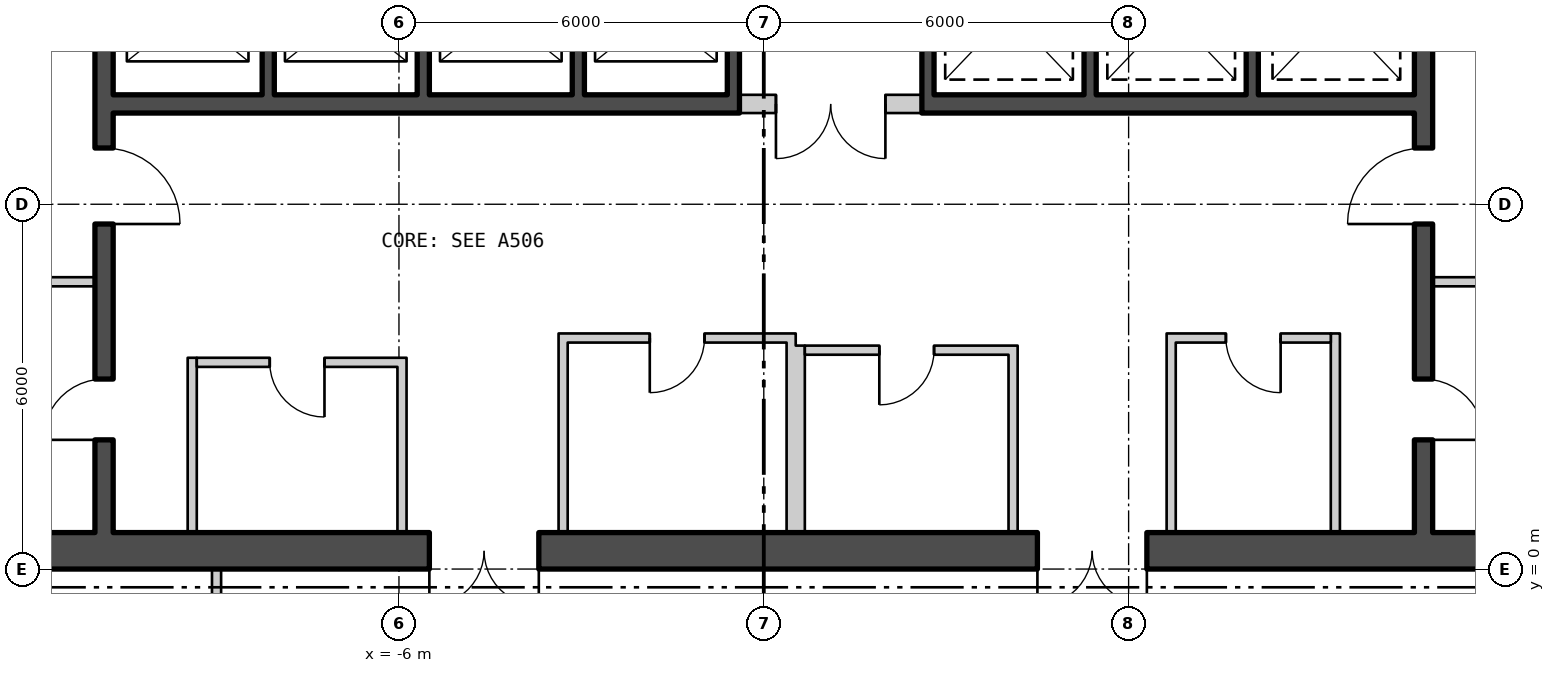
"""IFC4 building model, lengths in metres.
Left out: names, types, materials, properties, quantities, classifications, styles, units other than length and angle.
Written with IfcOpenShell. Run it as: python <this file> out.ifc"""

import sys

from ifc_helpers import new_model, si_unit, direction, frame, frame_2d, origin, place, context, subcontext, project, spatial, rectangle, extrude, element, fill, save


model = new_model("IFC4")
c1 = context("Model", 3, precision=1e-05, world=origin(), true_north=direction((0.0, 1.0)))
c2 = subcontext(c1, "Body", "Model", "MODEL_VIEW")
j1 = project(units=[si_unit("LENGTHUNIT", "METRE"), si_unit("PLANEANGLEUNIT", "RADIAN")], contexts=[c1])
p1 = place(None, origin())
s1 = spatial("IfcSite", under=j1, at=p1, CompositionType="ELEMENT")
p2 = place(p1, origin())
s2 = spatial("IfcBuilding", under=s1, at=p2, CompositionType="ELEMENT")
p3 = place(p2, frame((0.0, 0.0, 13.5)))
s3 = spatial("IfcBuildingStorey", under=s2, at=p3, CompositionType="ELEMENT", Elevation=13.5)
p4 = place(p3, frame((-17.5, 0.3, 0.0), z_axis=(0.0, 0.0, 1.0), x_axis=(1.0, 0.0, 0.0)))
e1 = element("IfcWall", 1, at=p4, inside=s3, PredefinedType="SHEAR", context=c2, shape_type="SweptSolid", body=[
    extrude(rectangle(XDim=35.0, YDim=0.6, at=frame_2d((17.5, 0.0))), origin(), (0.0, 0.0, 1.0), 4.88),
])
p5 = place(p4, frame((12.0, 0.0, 0.0)))
e2 = element("IfcOpeningElement", 2, at=p5, cuts=e1, PredefinedType="OPENING", context=c2, shape_type="SweptSolid", body=[
    extrude(rectangle(XDim=1.8, YDim=2.4, at=frame_2d((0.9, 1.2))), frame((0.0, 0.31, 0.0), z_axis=(0.0, -1.0, 0.0), x_axis=(1.0, 0.0, 0.0)), (0.0, 0.0, 1.0), 0.62),
])
p6 = place(p4, frame((22.0, 0.0, 0.0)))
e3 = element("IfcOpeningElement", 3, at=p6, cuts=e1, PredefinedType="OPENING", context=c2, shape_type="SweptSolid", body=[
    extrude(rectangle(XDim=1.8, YDim=2.4, at=frame_2d((0.9, 1.2))), frame((0.0, 0.31, 0.0), z_axis=(0.0, -1.0, 0.0), x_axis=(1.0, 0.0, 0.0)), (0.0, 0.0, 1.0), 0.62),
])
p7 = place(p3, frame((-10.85, 0.6, 0.0), z_axis=(0.0, 0.0, 1.0), x_axis=(0.0, 1.0, 0.0)))
e4 = element("IfcWall", 4, at=p7, inside=s3, PredefinedType="SHEAR", context=c2, shape_type="SweptSolid", body=[
    extrude(rectangle(XDim=16.8, YDim=0.3, at=frame_2d((8.4, 0.0))), origin(), (0.0, 0.0, 1.0), 4.88),
])
p8 = place(p7, frame((5.075, 0.0, 0.0)))
e5 = element("IfcOpeningElement", 5, at=p8, cuts=e4, PredefinedType="OPENING", context=c2, shape_type="SweptSolid", body=[
    extrude(rectangle(XDim=1.25, YDim=2.1, at=frame_2d((0.625, 1.05))), frame((0.0, 0.16, 0.0), z_axis=(0.0, -1.0, 0.0), x_axis=(1.0, 0.0, 0.0)), (0.0, 0.0, 1.0), 0.32),
])
p9 = place(p7, frame((1.525, 0.0, 0.0)))
e6 = element("IfcOpeningElement", 6, at=p9, cuts=e4, PredefinedType="OPENING", context=c2, shape_type="SweptSolid", body=[
    extrude(rectangle(XDim=1.0, YDim=2.1, at=frame_2d((0.5, 1.05))), frame((0.0, 0.16, 0.0), z_axis=(0.0, -1.0, 0.0), x_axis=(1.0, 0.0, 0.0)), (0.0, 0.0, 1.0), 0.32),
])
p10 = place(p3, frame((10.85, 0.6, 0.0), z_axis=(0.0, 0.0, 1.0), x_axis=(0.0, 1.0, 0.0)))
e7 = element("IfcWall", 7, at=p10, inside=s3, PredefinedType="SHEAR", context=c2, shape_type="SweptSolid", body=[
    extrude(rectangle(XDim=16.8, YDim=0.3, at=frame_2d((8.4, 0.0))), origin(), (0.0, 0.0, 1.0), 4.88),
])
p11 = place(p10, frame((5.075, 0.0, 0.0)))
e8 = element("IfcOpeningElement", 8, at=p11, cuts=e7, PredefinedType="OPENING", context=c2, shape_type="SweptSolid", body=[
    extrude(rectangle(XDim=1.25, YDim=2.1, at=frame_2d((0.625, 1.05))), frame((0.0, 0.16, 0.0), z_axis=(0.0, -1.0, 0.0), x_axis=(1.0, 0.0, 0.0)), (0.0, 0.0, 1.0), 0.32),
])
p12 = place(p10, frame((1.525, 0.0, 0.0)))
e9 = element("IfcOpeningElement", 9, at=p12, cuts=e7, PredefinedType="OPENING", context=c2, shape_type="SweptSolid", body=[
    extrude(rectangle(XDim=1.0, YDim=2.1, at=frame_2d((0.5, 1.05))), frame((0.0, 0.16, 0.0), z_axis=(0.0, -1.0, 0.0), x_axis=(1.0, 0.0, 0.0)), (0.0, 0.0, 1.0), 0.32),
])
p13 = place(p3, frame((-10.7, 7.65, 0.0), z_axis=(0.0, 0.0, 1.0), x_axis=(1.0, 0.0, 0.0)))
e10 = element("IfcWall", 10, at=p13, inside=s3, PredefinedType="SHEAR", context=c2, shape_type="SweptSolid", body=[
    extrude(rectangle(XDim=10.3, YDim=0.3, at=frame_2d((5.15, 0.0))), origin(), (0.0, 0.0, 1.0), 4.88),
])
p14 = place(p3, frame((2.6, 7.65, 0.0), z_axis=(0.0, 0.0, 1.0), x_axis=(1.0, 0.0, 0.0)))
e11 = element("IfcWall", 11, at=p14, inside=s3, PredefinedType="SHEAR", context=c2, shape_type="SweptSolid", body=[
    extrude(rectangle(XDim=8.1, YDim=0.3, at=frame_2d((4.05, 0.0))), origin(), (0.0, 0.0, 1.0), 4.88),
])
for number, where, z_axis, x_axis in (
    (12, (-8.15, 7.8, 0.0), (0.0, 0.0, 1.0), (0.0, 1.0, 0.0)),
    (13, (-5.6, 7.8, 0.0), (0.0, 0.0, 1.0), (0.0, 1.0, 0.0)),
    (14, (-3.05, 7.8, 0.0), (0.0, 0.0, 1.0), (0.0, 1.0, 0.0)),
    (15, (-0.5, 7.8, 0.0), (0.0, 0.0, 1.0), (0.0, 1.0, 0.0)),
    (16, (2.7, 7.8, 0.0), (0.0, 0.0, 1.0), (0.0, 1.0, 0.0)),
    (17, (5.367, 7.8, 0.0), (0.0, 0.0, 1.0), (0.0, 1.0, 0.0)),
    (18, (8.033, 7.8, 0.0), (0.0, 0.0, 1.0), (0.0, 1.0, 0.0)),
):
    element("IfcWall", number, at=place(p3, frame(where, z_axis=z_axis, x_axis=x_axis)), inside=s3, PredefinedType="SHEAR", context=c2, shape_type="SweptSolid", body=[
        extrude(rectangle(XDim=2.7, YDim=0.2, at=frame_2d((1.35, 0.0))), origin(), (0.0, 0.0, 1.0), 4.88),
    ])
for number, where, z_axis, x_axis in (
    (19, (-14.2, 4.725, 0.0), (0.0, 0.0, 1.0), (1.0, 0.0, 0.0)),
    (20, (11.0, 4.725, 0.0), (0.0, 0.0, 1.0), (1.0, 0.0, 0.0)),
):
    element("IfcWall", number, at=place(p3, frame(where, z_axis=z_axis, x_axis=x_axis)), inside=s3, PredefinedType="PARTITIONING", context=c2, shape_type="SweptSolid", body=[
        extrude(rectangle(XDim=3.2, YDim=0.15, at=frame_2d((1.6, 0.0))), origin(), (0.0, 0.0, 1.0), 4.88),
    ])
for number, where, z_axis, x_axis in (
    (21, (-9.4, 0.6, 0.0), (0.0, 0.0, 1.0), (0.0, 1.0, 0.0)),
    (22, (-5.95, 0.6, 0.0), (0.0, 0.0, 1.0), (0.0, 1.0, 0.0)),
):
    element("IfcWall", number, at=place(p3, frame(where, z_axis=z_axis, x_axis=x_axis)), inside=s3, PredefinedType="PARTITIONING", context=c2, shape_type="SweptSolid", body=[
        extrude(rectangle(XDim=2.875, YDim=0.15, at=frame_2d((1.438, 0.0))), origin(), (0.0, 0.0, 1.0), 4.88),
    ])
p15 = place(p3, frame((-9.325, 3.4, 0.0), z_axis=(0.0, 0.0, 1.0), x_axis=(1.0, 0.0, 0.0)))
e23 = element("IfcWall", 23, at=p15, inside=s3, PredefinedType="PARTITIONING", context=c2, shape_type="SweptSolid", body=[
    extrude(rectangle(XDim=3.3, YDim=0.15, at=frame_2d((1.65, 0.0))), origin(), (0.0, 0.0, 1.0), 4.88),
])
p16 = place(p15, frame((1.2, 0.0, 0.0)))
e24 = element("IfcOpeningElement", 24, at=p16, cuts=e23, PredefinedType="OPENING", context=c2, shape_type="SweptSolid", body=[
    extrude(rectangle(XDim=0.9, YDim=2.1, at=frame_2d((0.45, 1.05))), frame((0.0, 0.085, 0.0), z_axis=(0.0, -1.0, 0.0), x_axis=(1.0, 0.0, 0.0)), (0.0, 0.0, 1.0), 0.17),
])
for number, where, z_axis, x_axis in (
    (25, (-3.3, 0.6, 0.0), (0.0, 0.0, 1.0), (0.0, 1.0, 0.0)),
    (26, (0.45, 0.6, 0.0), (0.0, 0.0, 1.0), (0.0, 1.0, 0.0)),
):
    element("IfcWall", number, at=place(p3, frame(where, z_axis=z_axis, x_axis=x_axis)), inside=s3, PredefinedType="PARTITIONING", context=c2, shape_type="SweptSolid", body=[
        extrude(rectangle(XDim=3.275, YDim=0.15, at=frame_2d((1.637, 0.0))), origin(), (0.0, 0.0, 1.0), 4.88),
    ])
p17 = place(p3, frame((-3.225, 3.8, 0.0), z_axis=(0.0, 0.0, 1.0), x_axis=(1.0, 0.0, 0.0)))
e27 = element("IfcWall", 27, at=p17, inside=s3, PredefinedType="PARTITIONING", context=c2, shape_type="SweptSolid", body=[
    extrude(rectangle(XDim=3.6, YDim=0.15, at=frame_2d((1.8, 0.0))), origin(), (0.0, 0.0, 1.0), 4.88),
])
p18 = place(p17, frame((1.35, 0.0, 0.0)))
e28 = element("IfcOpeningElement", 28, at=p18, cuts=e27, PredefinedType="OPENING", context=c2, shape_type="SweptSolid", body=[
    extrude(rectangle(XDim=0.9, YDim=2.1, at=frame_2d((0.45, 1.05))), frame((0.0, 0.085, 0.0), z_axis=(0.0, -1.0, 0.0), x_axis=(1.0, 0.0, 0.0)), (0.0, 0.0, 1.0), 0.17),
])
for number, where, z_axis, x_axis in (
    (29, (0.6, 0.6, 0.0), (0.0, 0.0, 1.0), (0.0, 1.0, 0.0)),
    (30, (4.1, 0.6, 0.0), (0.0, 0.0, 1.0), (0.0, 1.0, 0.0)),
):
    element("IfcWall", number, at=place(p3, frame(where, z_axis=z_axis, x_axis=x_axis)), inside=s3, PredefinedType="PARTITIONING", context=c2, shape_type="SweptSolid", body=[
        extrude(rectangle(XDim=3.075, YDim=0.15, at=frame_2d((1.538, 0.0))), origin(), (0.0, 0.0, 1.0), 4.88),
    ])
p19 = place(p3, frame((0.675, 3.6, 0.0), z_axis=(0.0, 0.0, 1.0), x_axis=(1.0, 0.0, 0.0)))
e31 = element("IfcWall", 31, at=p19, inside=s3, PredefinedType="PARTITIONING", context=c2, shape_type="SweptSolid", body=[
    extrude(rectangle(XDim=3.35, YDim=0.15, at=frame_2d((1.675, 0.0))), origin(), (0.0, 0.0, 1.0), 4.88),
])
p20 = place(p19, frame((1.225, 0.0, 0.0)))
e32 = element("IfcOpeningElement", 32, at=p20, cuts=e31, PredefinedType="OPENING", context=c2, shape_type="SweptSolid", body=[
    extrude(rectangle(XDim=0.9, YDim=2.1, at=frame_2d((0.45, 1.05))), frame((0.0, 0.085, 0.0), z_axis=(0.0, -1.0, 0.0), x_axis=(1.0, 0.0, 0.0)), (0.0, 0.0, 1.0), 0.17),
])
for number, where, z_axis, x_axis in (
    (33, (6.7, 0.6, 0.0), (0.0, 0.0, 1.0), (0.0, 1.0, 0.0)),
    (34, (9.4, 0.6, 0.0), (0.0, 0.0, 1.0), (0.0, 1.0, 0.0)),
):
    element("IfcWall", number, at=place(p3, frame(where, z_axis=z_axis, x_axis=x_axis)), inside=s3, PredefinedType="PARTITIONING", context=c2, shape_type="SweptSolid", body=[
        extrude(rectangle(XDim=3.275, YDim=0.15, at=frame_2d((1.637, 0.0))), origin(), (0.0, 0.0, 1.0), 4.88),
    ])
p21 = place(p3, frame((6.775, 3.8, 0.0), z_axis=(0.0, 0.0, 1.0), x_axis=(1.0, 0.0, 0.0)))
e35 = element("IfcWall", 35, at=p21, inside=s3, PredefinedType="PARTITIONING", context=c2, shape_type="SweptSolid", body=[
    extrude(rectangle(XDim=2.55, YDim=0.15, at=frame_2d((1.275, 0.0))), origin(), (0.0, 0.0, 1.0), 4.88),
])
p22 = place(p21, frame((0.825, 0.0, 0.0)))
e36 = element("IfcOpeningElement", 36, at=p22, cuts=e35, PredefinedType="OPENING", context=c2, shape_type="SweptSolid", body=[
    extrude(rectangle(XDim=0.9, YDim=2.1, at=frame_2d((0.45, 1.05))), frame((0.0, 0.085, 0.0), z_axis=(0.0, -1.0, 0.0), x_axis=(1.0, 0.0, 0.0)), (0.0, 0.0, 1.0), 0.17),
])
p23 = place(p3, frame((-0.4, 7.65, 0.0), z_axis=(0.0, 0.0, 1.0), x_axis=(1.0, 0.0, 0.0)))
e37 = element("IfcWall", 37, at=p23, inside=s3, PredefinedType="PARTITIONING", context=c2, shape_type="SweptSolid", body=[
    extrude(rectangle(XDim=3.0, YDim=0.3, at=frame_2d((1.5, 0.0))), origin(), (0.0, 0.0, 1.0), 4.88),
])
p24 = place(p23, frame((0.6, 0.0, 0.0)))
e38 = element("IfcOpeningElement", 38, at=p24, cuts=e37, PredefinedType="OPENING", context=c2, shape_type="SweptSolid", body=[
    extrude(rectangle(XDim=1.8, YDim=2.4, at=frame_2d((0.9, 1.2))), frame((0.0, 0.16, 0.0), z_axis=(0.0, -1.0, 0.0), x_axis=(1.0, 0.0, 0.0)), (0.0, 0.0, 1.0), 0.32),
])
p25 = place(p3, frame((-9.0, -13.675, 0.0), z_axis=(0.0, 0.0, 1.0), x_axis=(0.0, 1.0, 0.0)))
e39 = element("IfcWall", 39, at=p25, inside=s3, PredefinedType="PARTITIONING", context=c2, shape_type="SweptSolid", body=[
    extrude(rectangle(XDim=13.675, YDim=0.15, at=frame_2d((6.838, 0.0))), origin(), (0.0, 0.0, 1.0), 4.88),
])
p26 = place(p25, frame((11.975, 0.0, 0.0)))
e40 = element("IfcOpeningElement", 40, at=p26, cuts=e39, PredefinedType="OPENING", context=c2, shape_type="SweptSolid", body=[
    extrude(rectangle(XDim=1.0, YDim=2.1, at=frame_2d((0.5, 1.05))), frame((0.0, 0.085, 0.0), z_axis=(0.0, -1.0, 0.0), x_axis=(1.0, 0.0, 0.0)), (0.0, 0.0, 1.0), 0.17),
])
p27 = place(p8, origin())
e41 = element("IfcDoor", 41, at=p27, inside=s3, OperationType="SINGLE_SWING_LEFT", PredefinedType="DOOR", context=c2, shape_type="SweptSolid", body=[
    extrude(rectangle(XDim=1.25, YDim=2.1, at=frame_2d((0.625, 1.05))), frame((0.0, 0.025, 0.0), z_axis=(0.0, -1.0, 0.0), x_axis=(1.0, 0.0, 0.0)), (0.0, 0.0, 1.0), 0.05),
])
fill(e5, e41)
p28 = place(p9, origin())
e42 = element("IfcDoor", 42, at=p28, inside=s3, OperationType="SINGLE_SWING_RIGHT", PredefinedType="DOOR", context=c2, shape_type="SweptSolid", body=[
    extrude(rectangle(XDim=1.0, YDim=2.1, at=frame_2d((0.5, 1.05))), frame((0.0, 0.025, 0.0), z_axis=(0.0, -1.0, 0.0), x_axis=(1.0, 0.0, 0.0)), (0.0, 0.0, 1.0), 0.05),
])
fill(e6, e42)
p29 = place(p11, origin())
e43 = element("IfcDoor", 43, at=p29, inside=s3, OperationType="SINGLE_SWING_RIGHT", PredefinedType="DOOR", context=c2, shape_type="SweptSolid", body=[
    extrude(rectangle(XDim=1.25, YDim=2.1, at=frame_2d((0.625, 1.05))), frame((0.0, 0.025, 0.0), z_axis=(0.0, -1.0, 0.0), x_axis=(1.0, 0.0, 0.0)), (0.0, 0.0, 1.0), 0.05),
])
fill(e8, e43)
p30 = place(p12, origin())
e44 = element("IfcDoor", 44, at=p30, inside=s3, OperationType="SINGLE_SWING_LEFT", PredefinedType="DOOR", context=c2, shape_type="SweptSolid", body=[
    extrude(rectangle(XDim=1.0, YDim=2.1, at=frame_2d((0.5, 1.05))), frame((0.0, 0.025, 0.0), z_axis=(0.0, -1.0, 0.0), x_axis=(1.0, 0.0, 0.0)), (0.0, 0.0, 1.0), 0.05),
])
fill(e9, e44)
p31 = place(p16, origin())
e45 = element("IfcDoor", 45, at=p31, inside=s3, OperationType="SINGLE_SWING_RIGHT", PredefinedType="DOOR", context=c2, shape_type="SweptSolid", body=[
    extrude(rectangle(XDim=0.9, YDim=2.1, at=frame_2d((0.45, 1.05))), frame((0.0, 0.025, 0.0), z_axis=(0.0, -1.0, 0.0), x_axis=(1.0, 0.0, 0.0)), (0.0, 0.0, 1.0), 0.05),
])
fill(e24, e45)
p32 = place(p18, origin())
e46 = element("IfcDoor", 46, at=p32, inside=s3, OperationType="SINGLE_SWING_LEFT", PredefinedType="DOOR", context=c2, shape_type="SweptSolid", body=[
    extrude(rectangle(XDim=0.9, YDim=2.1, at=frame_2d((0.45, 1.05))), frame((0.0, 0.025, 0.0), z_axis=(0.0, -1.0, 0.0), x_axis=(1.0, 0.0, 0.0)), (0.0, 0.0, 1.0), 0.05),
])
fill(e28, e46)
p33 = place(p20, origin())
e47 = element("IfcDoor", 47, at=p33, inside=s3, OperationType="SINGLE_SWING_LEFT", PredefinedType="DOOR", context=c2, shape_type="SweptSolid", body=[
    extrude(rectangle(XDim=0.9, YDim=2.1, at=frame_2d((0.45, 1.05))), frame((0.0, 0.025, 0.0), z_axis=(0.0, -1.0, 0.0), x_axis=(1.0, 0.0, 0.0)), (0.0, 0.0, 1.0), 0.05),
])
fill(e32, e47)
p34 = place(p22, origin())
e48 = element("IfcDoor", 48, at=p34, inside=s3, OperationType="SINGLE_SWING_RIGHT", PredefinedType="DOOR", context=c2, shape_type="SweptSolid", body=[
    extrude(rectangle(XDim=0.9, YDim=2.1, at=frame_2d((0.45, 1.05))), frame((0.0, 0.025, 0.0), z_axis=(0.0, -1.0, 0.0), x_axis=(1.0, 0.0, 0.0)), (0.0, 0.0, 1.0), 0.05),
])
fill(e36, e48)
p35 = place(p24, origin())
e49 = element("IfcDoor", 49, at=p35, inside=s3, OperationType="DOUBLE_DOOR_SINGLE_SWING", PredefinedType="DOOR", context=c2, shape_type="SweptSolid", body=[
    extrude(rectangle(XDim=1.8, YDim=2.4, at=frame_2d((0.9, 1.2))), frame((0.0, 0.025, 0.0), z_axis=(0.0, -1.0, 0.0), x_axis=(1.0, 0.0, 0.0)), (0.0, 0.0, 1.0), 0.05),
])
fill(e38, e49)
p36 = place(p5, origin())
e50 = element("IfcDoor", 50, at=p36, inside=s3, OperationType="DOUBLE_DOOR_SINGLE_SWING", PredefinedType="DOOR", context=c2, shape_type="SweptSolid", body=[
    extrude(rectangle(XDim=1.8, YDim=2.4, at=frame_2d((0.9, 1.2))), frame((0.0, 0.025, 0.0), z_axis=(0.0, -1.0, 0.0), x_axis=(1.0, 0.0, 0.0)), (0.0, 0.0, 1.0), 0.05),
])
fill(e2, e50)
p37 = place(p6, origin())
e51 = element("IfcDoor", 51, at=p37, inside=s3, OperationType="DOUBLE_DOOR_SINGLE_SWING", PredefinedType="DOOR", context=c2, shape_type="SweptSolid", body=[
    extrude(rectangle(XDim=1.8, YDim=2.4, at=frame_2d((0.9, 1.2))), frame((0.0, 0.025, 0.0), z_axis=(0.0, -1.0, 0.0), x_axis=(1.0, 0.0, 0.0)), (0.0, 0.0, 1.0), 0.05),
])
fill(e3, e51)
save(model, sys.argv[1])
